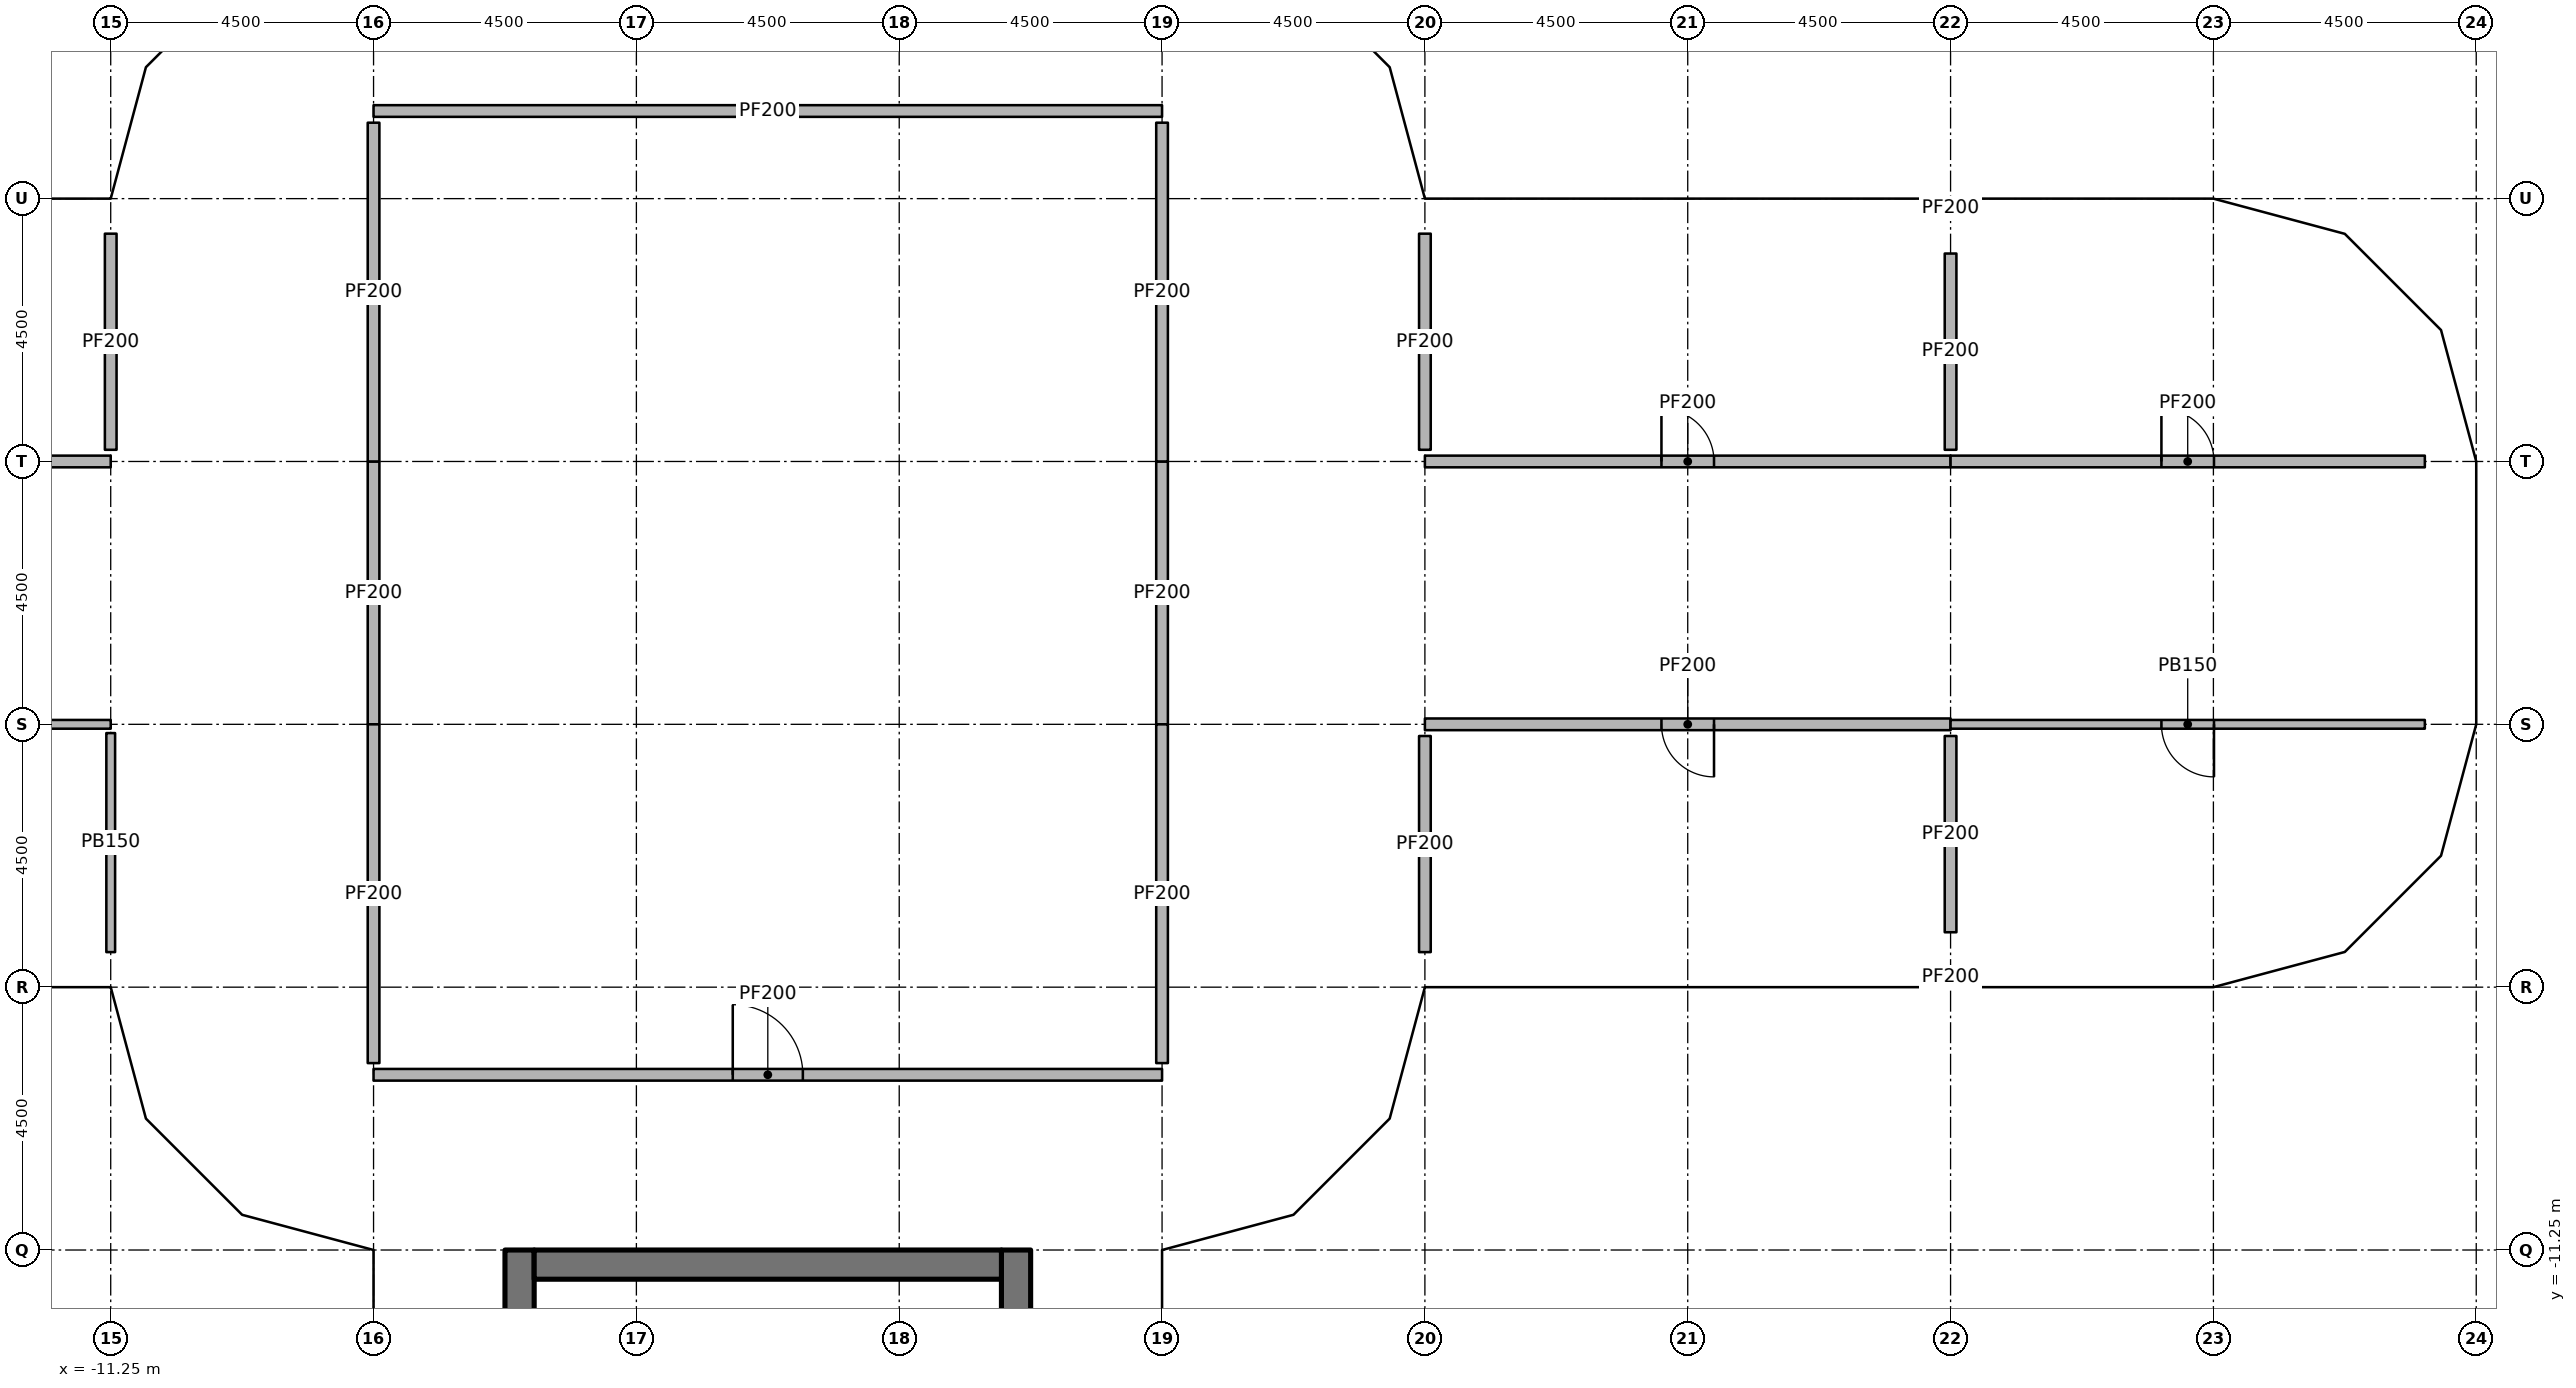
"""IFC4 building model, lengths in metres.
Left out: names, types, materials, properties, quantities, classifications, styles, units other than length and angle.
Written with IfcOpenShell. Run it as: python <this file> out.ifc"""

import sys

from ifc_helpers import new_model, si_unit, direction, frame, frame_2d, origin, origin_2d, place, context, subcontext, project, spatial, rectangle, extrude, element, fill, save


model = new_model("IFC4")
c1 = context("Model", 3, precision=1e-05, world=origin(), true_north=direction((0.0, 1.0)))
c2 = subcontext(c1, "Body", "Model", "MODEL_VIEW")
j1 = project(units=[si_unit("LENGTHUNIT", "METRE"), si_unit("PLANEANGLEUNIT", "RADIAN")], contexts=[c1])
p1 = place(None, origin())
s1 = spatial("IfcSite", under=j1, at=p1, CompositionType="ELEMENT")
p2 = place(p1, origin())
s2 = spatial("IfcBuilding", under=s1, at=p2, CompositionType="ELEMENT")
p3 = place(p2, frame((0.0, 0.0, 284.0)))
s3 = spatial("IfcBuildingStorey", under=s2, at=p3, CompositionType="ELEMENT", Elevation=284.0)
for number, where, z_axis, x_axis in (
    (1, (-10.75, -6.25, 0.0), (0.0, 0.0, 1.0), (1.0, 0.0, 0.0)),
    (2, (-10.75, 6.25, 0.0), (0.0, 0.0, 1.0), (1.0, 0.0, 0.0)),
    (3, (-6.25, -10.75, 0.0), (0.0, 0.0, 1.0), (1.0, 0.0, 0.0)),
    (4, (-6.25, -6.25, 0.0), (0.0, 0.0, 1.0), (1.0, 0.0, 0.0)),
    (5, (-6.25, 6.25, 0.0), (0.0, 0.0, 1.0), (1.0, 0.0, 0.0)),
    (6, (6.25, -10.75, 0.0), (0.0, 0.0, 1.0), (1.0, 0.0, 0.0)),
    (7, (6.25, -6.25, 0.0), (0.0, 0.0, 1.0), (1.0, 0.0, 0.0)),
    (8, (6.25, 6.25, 0.0), (0.0, 0.0, 1.0), (1.0, 0.0, 0.0)),
    (9, (10.75, -6.25, 0.0), (0.0, 0.0, 1.0), (1.0, 0.0, 0.0)),
    (10, (10.75, 6.25, 0.0), (0.0, 0.0, 1.0), (1.0, 0.0, 0.0)),
    (11, (15.75, -6.25, 0.0), (0.0, 0.0, 1.0), (1.0, 0.0, 0.0)),
    (12, (15.75, 6.25, 0.0), (0.0, 0.0, 1.0), (1.0, 0.0, 0.0)),
    (13, (20.25, -6.11, 0.0), (0.0, 0.0, 1.0), (1.0, 0.0, 0.0)),
    (14, (20.25, 6.11, 0.0), (0.0, 0.0, 1.0), (1.0, 0.0, 0.0)),
    (15, (24.75, -6.11, 0.0), (0.0, 0.0, 1.0), (1.0, 0.0, 0.0)),
    (16, (24.75, 6.11, 0.0), (0.0, 0.0, 1.0), (1.0, 0.0, 0.0)),
    (17, (28.67, -2.25, 0.0), (0.0, 0.0, 1.0), (1.0, 0.0, 0.0)),
    (18, (28.67, 2.25, 0.0), (0.0, 0.0, 1.0), (1.0, 0.0, 0.0)),
):
    element("IfcColumn", number, at=place(p3, frame(where, z_axis=z_axis, x_axis=x_axis)), inside=s3, PredefinedType="COLUMN", context=c2, shape_type="SweptSolid", body=[
        extrude(rectangle(XDim=0.6, YDim=0.6, at=origin_2d()), origin(), (0.0, 0.0, 1.0), 7.45),
    ])
p4 = place(p3, frame((-4.25, -11.25, 0.0), z_axis=(0.0, 0.0, 1.0), x_axis=(0.0, -1.0, 0.0)))
e19 = element("IfcWall", 19, at=p4, inside=s3, PredefinedType="SHEAR", context=c2, shape_type="SweptSolid", body=[
    extrude(rectangle(XDim=15.0, YDim=0.5, at=frame_2d((7.5, 0.0))), origin(), (0.0, 0.0, 1.0), 7.6),
])
p5 = place(p4, frame((7.15, 0.0, 0.0)))
e20 = element("IfcOpeningElement", 20, at=p5, cuts=e19, PredefinedType="OPENING", context=c2, shape_type="SweptSolid", body=[
    extrude(rectangle(XDim=1.5, YDim=2.3, at=frame_2d((0.75, 1.15))), frame((0.0, 0.26, 0.0), z_axis=(0.0, -1.0, 0.0), x_axis=(1.0, 0.0, 0.0)), (0.0, 0.0, 1.0), 0.52),
])
p6 = place(p4, frame((5.55, 0.0, 0.0)))
e21 = element("IfcOpeningElement", 21, at=p6, cuts=e19, PredefinedType="OPENING", context=c2, shape_type="SweptSolid", body=[
    extrude(rectangle(XDim=1.2, YDim=2.1, at=frame_2d((0.6, 1.05))), frame((0.0, 0.26, 0.0), z_axis=(0.0, -1.0, 0.0), x_axis=(1.0, 0.0, 0.0)), (0.0, 0.0, 1.0), 0.52),
])
p7 = place(p3, frame((4.25, -11.25, 0.0), z_axis=(0.0, 0.0, 1.0), x_axis=(0.0, -1.0, 0.0)))
e22 = element("IfcWall", 22, at=p7, inside=s3, PredefinedType="SHEAR", context=c2, shape_type="SweptSolid", body=[
    extrude(rectangle(XDim=15.0, YDim=0.5, at=frame_2d((7.5, 0.0))), origin(), (0.0, 0.0, 1.0), 7.6),
])
p8 = place(p7, frame((7.15, 0.0, 0.0)))
e23 = element("IfcOpeningElement", 23, at=p8, cuts=e22, PredefinedType="OPENING", context=c2, shape_type="SweptSolid", body=[
    extrude(rectangle(XDim=1.5, YDim=2.3, at=frame_2d((0.75, 1.15))), frame((0.0, 0.26, 0.0), z_axis=(0.0, -1.0, 0.0), x_axis=(1.0, 0.0, 0.0)), (0.0, 0.0, 1.0), 0.52),
])
p9 = place(p7, frame((13.9, 0.0, 0.0)))
e24 = element("IfcOpeningElement", 24, at=p9, cuts=e22, PredefinedType="OPENING", context=c2, shape_type="SweptSolid", body=[
    extrude(rectangle(XDim=0.9, YDim=2.1, at=frame_2d((0.45, 1.05))), frame((0.0, 0.26, 0.0), z_axis=(0.0, -1.0, 0.0), x_axis=(1.0, 0.0, 0.0)), (0.0, 0.0, 1.0), 0.52),
])
p10 = place(p7, frame((1.15, 0.0, 0.0)))
e25 = element("IfcOpeningElement", 25, at=p10, cuts=e22, PredefinedType="OPENING", context=c2, shape_type="SweptSolid", body=[
    extrude(rectangle(XDim=1.2, YDim=2.1, at=frame_2d((0.6, 1.05))), frame((0.0, 0.26, 0.0), z_axis=(0.0, -1.0, 0.0), x_axis=(1.0, 0.0, 0.0)), (0.0, 0.0, 1.0), 0.52),
])
p11 = place(p3, frame((-4.0, -11.5, 0.0), z_axis=(0.0, 0.0, 1.0), x_axis=(1.0, 0.0, 0.0)))
e26 = element("IfcWall", 26, at=p11, inside=s3, PredefinedType="SHEAR", context=c2, shape_type="SweptSolid", body=[
    extrude(rectangle(XDim=8.0, YDim=0.5, at=frame_2d((4.0, 0.0))), origin(), (0.0, 0.0, 1.0), 7.6),
])
p12 = place(p3, frame((-6.75, -8.25, 0.0), z_axis=(0.0, 0.0, 1.0), x_axis=(1.0, 0.0, 0.0)))
e27 = element("IfcWall", 27, at=p12, inside=s3, PredefinedType="PARTITIONING", context=c2, shape_type="SweptSolid", body=[
    extrude(rectangle(XDim=13.5, YDim=0.2, at=frame_2d((6.75, 0.0))), origin(), (0.0, 0.0, 1.0), 7.45),
])
p13 = place(p12, frame((6.15, 0.0, 0.0)))
e28 = element("IfcOpeningElement", 28, at=p13, cuts=e27, PredefinedType="OPENING", context=c2, shape_type="SweptSolid", body=[
    extrude(rectangle(XDim=1.2, YDim=2.1, at=frame_2d((0.6, 1.05))), frame((0.0, 0.11, 0.0), z_axis=(0.0, -1.0, 0.0), x_axis=(1.0, 0.0, 0.0)), (0.0, 0.0, 1.0), 0.22),
])
p14 = place(p3, frame((-6.75, 8.25, 0.0), z_axis=(0.0, 0.0, 1.0), x_axis=(1.0, 0.0, 0.0)))
e29 = element("IfcWall", 29, at=p14, inside=s3, PredefinedType="PARTITIONING", context=c2, shape_type="SweptSolid", body=[
    extrude(rectangle(XDim=13.5, YDim=0.2, at=frame_2d((6.75, 0.0))), origin(), (0.0, 0.0, 1.0), 7.45),
])
for number, where, z_axis, x_axis in (
    (30, (6.75, 2.25, 0.0), (0.0, 0.0, 1.0), (0.0, -1.0, 0.0)),
    (31, (-6.75, -2.25, 0.0), (0.0, 0.0, 1.0), (0.0, 1.0, 0.0)),
):
    element("IfcWall", number, at=place(p3, frame(where, z_axis=z_axis, x_axis=x_axis)), inside=s3, PredefinedType="PARTITIONING", context=c2, shape_type="SweptSolid", body=[
        extrude(rectangle(XDim=4.5, YDim=0.2, at=frame_2d((2.25, 0.0))), origin(), (0.0, 0.0, 1.0), 7.45),
    ])
for number, where, z_axis, x_axis in (
    (32, (-6.75, -8.05, 0.0), (0.0, 0.0, 1.0), (0.0, 1.0, 0.0)),
    (33, (6.75, -2.25, 0.0), (0.0, 0.0, 1.0), (0.0, -1.0, 0.0)),
    (34, (-6.75, 2.25, 0.0), (0.0, 0.0, 1.0), (0.0, 1.0, 0.0)),
    (35, (6.75, 8.05, 0.0), (0.0, 0.0, 1.0), (0.0, -1.0, 0.0)),
):
    element("IfcWall", number, at=place(p3, frame(where, z_axis=z_axis, x_axis=x_axis)), inside=s3, PredefinedType="PARTITIONING", context=c2, shape_type="SweptSolid", body=[
        extrude(rectangle(XDim=5.8, YDim=0.2, at=frame_2d((2.9, 0.0))), origin(), (0.0, 0.0, 1.0), 6.681),
    ])
p15 = place(p3, frame((11.25, 2.25, 0.0), z_axis=(0.0, 0.0, 1.0), x_axis=(1.0, 0.0, 0.0)))
e36 = element("IfcWall", 36, at=p15, inside=s3, PredefinedType="PARTITIONING", context=c2, shape_type="SweptSolid", body=[
    extrude(rectangle(XDim=9.0, YDim=0.2, at=frame_2d((4.5, 0.0))), origin(), (0.0, 0.0, 1.0), 6.828),
])
p16 = place(p15, frame((4.05, 0.0, 0.0)))
e37 = element("IfcOpeningElement", 37, at=p16, cuts=e36, PredefinedType="OPENING", context=c2, shape_type="SweptSolid", body=[
    extrude(rectangle(XDim=0.9, YDim=2.1, at=frame_2d((0.45, 1.05))), frame((0.0, 0.11, 0.0), z_axis=(0.0, -1.0, 0.0), x_axis=(1.0, 0.0, 0.0)), (0.0, 0.0, 1.0), 0.22),
])
p17 = place(p3, frame((20.25, -2.25, 0.0), z_axis=(0.0, 0.0, 1.0), x_axis=(-1.0, 0.0, 0.0)))
e38 = element("IfcWall", 38, at=p17, inside=s3, PredefinedType="PARTITIONING", context=c2, shape_type="SweptSolid", body=[
    extrude(rectangle(XDim=9.0, YDim=0.2, at=frame_2d((4.5, 0.0))), origin(), (0.0, 0.0, 1.0), 6.828),
])
p18 = place(p17, frame((4.05, 0.0, 0.0)))
e39 = element("IfcOpeningElement", 39, at=p18, cuts=e38, PredefinedType="OPENING", context=c2, shape_type="SweptSolid", body=[
    extrude(rectangle(XDim=0.9, YDim=2.1, at=frame_2d((0.45, 1.05))), frame((0.0, 0.11, 0.0), z_axis=(0.0, -1.0, 0.0), x_axis=(1.0, 0.0, 0.0)), (0.0, 0.0, 1.0), 0.22),
])
p19 = place(p3, frame((20.25, 2.25, 0.0), z_axis=(0.0, 0.0, 1.0), x_axis=(1.0, 0.0, 0.0)))
e40 = element("IfcWall", 40, at=p19, inside=s3, PredefinedType="PARTITIONING", context=c2, shape_type="SweptSolid", body=[
    extrude(rectangle(XDim=8.12, YDim=0.2, at=frame_2d((4.06, 0.0))), origin(), (0.0, 0.0, 1.0), 6.53),
])
p20 = place(p19, frame((3.61, 0.0, 0.0)))
e41 = element("IfcOpeningElement", 41, at=p20, cuts=e40, PredefinedType="OPENING", context=c2, shape_type="SweptSolid", body=[
    extrude(rectangle(XDim=0.9, YDim=2.1, at=frame_2d((0.45, 1.05))), frame((0.0, 0.11, 0.0), z_axis=(0.0, -1.0, 0.0), x_axis=(1.0, 0.0, 0.0)), (0.0, 0.0, 1.0), 0.22),
])
p21 = place(p3, frame((28.37, -2.25, 0.0), z_axis=(0.0, 0.0, 1.0), x_axis=(-1.0, 0.0, 0.0)))
e42 = element("IfcWall", 42, at=p21, inside=s3, PredefinedType="PARTITIONING", context=c2, shape_type="SweptSolid", body=[
    extrude(rectangle(XDim=8.12, YDim=0.15, at=frame_2d((4.06, 0.0))), origin(), (0.0, 0.0, 1.0), 6.53),
])
p22 = place(p21, frame((3.61, 0.0, 0.0)))
e43 = element("IfcOpeningElement", 43, at=p22, cuts=e42, PredefinedType="OPENING", context=c2, shape_type="SweptSolid", body=[
    extrude(rectangle(XDim=0.9, YDim=2.1, at=frame_2d((0.45, 1.05))), frame((0.0, 0.085, 0.0), z_axis=(0.0, -1.0, 0.0), x_axis=(1.0, 0.0, 0.0)), (0.0, 0.0, 1.0), 0.17),
])
p23 = place(p3, frame((-20.25, 2.25, 0.0), z_axis=(0.0, 0.0, 1.0), x_axis=(1.0, 0.0, 0.0)))
e44 = element("IfcWall", 44, at=p23, inside=s3, PredefinedType="PARTITIONING", context=c2, shape_type="SweptSolid", body=[
    extrude(rectangle(XDim=9.0, YDim=0.2, at=frame_2d((4.5, 0.0))), origin(), (0.0, 0.0, 1.0), 6.828),
])
p24 = place(p23, frame((4.05, 0.0, 0.0)))
e45 = element("IfcOpeningElement", 45, at=p24, cuts=e44, PredefinedType="OPENING", context=c2, shape_type="SweptSolid", body=[
    extrude(rectangle(XDim=0.9, YDim=2.1, at=frame_2d((0.45, 1.05))), frame((0.0, 0.11, 0.0), z_axis=(0.0, -1.0, 0.0), x_axis=(1.0, 0.0, 0.0)), (0.0, 0.0, 1.0), 0.22),
])
p25 = place(p3, frame((-11.25, -2.25, 0.0), z_axis=(0.0, 0.0, 1.0), x_axis=(-1.0, 0.0, 0.0)))
e46 = element("IfcWall", 46, at=p25, inside=s3, PredefinedType="PARTITIONING", context=c2, shape_type="SweptSolid", body=[
    extrude(rectangle(XDim=9.0, YDim=0.15, at=frame_2d((4.5, 0.0))), origin(), (0.0, 0.0, 1.0), 6.828),
])
p26 = place(p25, frame((4.05, 0.0, 0.0)))
e47 = element("IfcOpeningElement", 47, at=p26, cuts=e46, PredefinedType="OPENING", context=c2, shape_type="SweptSolid", body=[
    extrude(rectangle(XDim=0.9, YDim=2.1, at=frame_2d((0.45, 1.05))), frame((0.0, 0.085, 0.0), z_axis=(0.0, -1.0, 0.0), x_axis=(1.0, 0.0, 0.0)), (0.0, 0.0, 1.0), 0.17),
])
p27 = place(p3, frame((20.25, 6.75, 0.0), z_axis=(0.0, 0.0, 1.0), x_axis=(0.0, -1.0, 0.0)))
e48 = element("IfcWall", 48, at=p27, inside=s3, PredefinedType="PARTITIONING", context=c2, shape_type="SweptSolid", body=[
    extrude(rectangle(XDim=0.34, YDim=0.2, at=frame_2d((0.17, 0.0))), origin(), (0.0, 0.0, 1.0), 7.45),
])
p28 = place(p3, frame((20.25, 5.81, 0.0), z_axis=(0.0, 0.0, 1.0), x_axis=(0.0, -1.0, 0.0)))
e49 = element("IfcWall", 49, at=p28, inside=s3, PredefinedType="PARTITIONING", context=c2, shape_type="SweptSolid", body=[
    extrude(rectangle(XDim=3.36, YDim=0.2, at=frame_2d((1.68, 0.0))), origin(), (0.0, 0.0, 1.0), 7.45),
])
p29 = place(p3, frame((11.25, 2.45, 0.0), z_axis=(0.0, 0.0, 1.0), x_axis=(0.0, 1.0, 0.0)))
e50 = element("IfcWall", 50, at=p29, inside=s3, PredefinedType="PARTITIONING", context=c2, shape_type="SweptSolid", body=[
    extrude(rectangle(XDim=3.7, YDim=0.2, at=frame_2d((1.85, 0.0))), origin(), (0.0, 0.0, 1.0), 7.45),
])
p30 = place(p3, frame((20.25, -2.45, 0.0), z_axis=(0.0, 0.0, 1.0), x_axis=(0.0, -1.0, 0.0)))
e51 = element("IfcWall", 51, at=p30, inside=s3, PredefinedType="PARTITIONING", context=c2, shape_type="SweptSolid", body=[
    extrude(rectangle(XDim=3.36, YDim=0.2, at=frame_2d((1.68, 0.0))), origin(), (0.0, 0.0, 1.0), 7.45),
])
p31 = place(p3, frame((20.25, -6.41, 0.0), z_axis=(0.0, 0.0, 1.0), x_axis=(0.0, -1.0, 0.0)))
e52 = element("IfcWall", 52, at=p31, inside=s3, PredefinedType="PARTITIONING", context=c2, shape_type="SweptSolid", body=[
    extrude(rectangle(XDim=0.34, YDim=0.2, at=frame_2d((0.17, 0.0))), origin(), (0.0, 0.0, 1.0), 7.45),
])
for number, where, z_axis, x_axis in (
    (53, (11.25, -6.15, 0.0), (0.0, 0.0, 1.0), (0.0, 1.0, 0.0)),
    (54, (-11.25, 6.15, 0.0), (0.0, 0.0, 1.0), (0.0, -1.0, 0.0)),
):
    element("IfcWall", number, at=place(p3, frame(where, z_axis=z_axis, x_axis=x_axis)), inside=s3, PredefinedType="PARTITIONING", context=c2, shape_type="SweptSolid", body=[
        extrude(rectangle(XDim=3.7, YDim=0.2, at=frame_2d((1.85, 0.0))), origin(), (0.0, 0.0, 1.0), 7.45),
    ])
p32 = place(p3, frame((-11.25, -2.4, 0.0), z_axis=(0.0, 0.0, 1.0), x_axis=(0.0, -1.0, 0.0)))
e55 = element("IfcWall", 55, at=p32, inside=s3, PredefinedType="PARTITIONING", context=c2, shape_type="SweptSolid", body=[
    extrude(rectangle(XDim=3.75, YDim=0.15, at=frame_2d((1.875, 0.0))), origin(), (0.0, 0.0, 1.0), 7.45),
])
p33 = place(p13, origin())
e56 = element("IfcDoor", 56, at=p33, inside=s3, OperationType="SINGLE_SWING_LEFT", PredefinedType="DOOR", context=c2, shape_type="SweptSolid", body=[
    extrude(rectangle(XDim=1.2, YDim=2.1, at=frame_2d((0.6, 1.05))), frame((0.0, 0.025, 0.0), z_axis=(0.0, -1.0, 0.0), x_axis=(1.0, 0.0, 0.0)), (0.0, 0.0, 1.0), 0.05),
])
fill(e28, e56)
p34 = place(p16, origin())
e57 = element("IfcDoor", 57, at=p34, inside=s3, OperationType="SINGLE_SWING_LEFT", PredefinedType="DOOR", context=c2, shape_type="SweptSolid", body=[
    extrude(rectangle(XDim=0.9, YDim=2.1, at=frame_2d((0.45, 1.05))), frame((0.0, 0.025, 0.0), z_axis=(0.0, -1.0, 0.0), x_axis=(1.0, 0.0, 0.0)), (0.0, 0.0, 1.0), 0.05),
])
fill(e37, e57)
p35 = place(p18, origin())
e58 = element("IfcDoor", 58, at=p35, inside=s3, OperationType="SINGLE_SWING_LEFT", PredefinedType="DOOR", context=c2, shape_type="SweptSolid", body=[
    extrude(rectangle(XDim=0.9, YDim=2.1, at=frame_2d((0.45, 1.05))), frame((0.0, 0.025, 0.0), z_axis=(0.0, -1.0, 0.0), x_axis=(1.0, 0.0, 0.0)), (0.0, 0.0, 1.0), 0.05),
])
fill(e39, e58)
p36 = place(p20, origin())
e59 = element("IfcDoor", 59, at=p36, inside=s3, OperationType="SINGLE_SWING_LEFT", PredefinedType="DOOR", context=c2, shape_type="SweptSolid", body=[
    extrude(rectangle(XDim=0.9, YDim=2.1, at=frame_2d((0.45, 1.05))), frame((0.0, 0.025, 0.0), z_axis=(0.0, -1.0, 0.0), x_axis=(1.0, 0.0, 0.0)), (0.0, 0.0, 1.0), 0.05),
])
fill(e41, e59)
p37 = place(p22, origin())
e60 = element("IfcDoor", 60, at=p37, inside=s3, OperationType="SINGLE_SWING_LEFT", PredefinedType="DOOR", context=c2, shape_type="SweptSolid", body=[
    extrude(rectangle(XDim=0.9, YDim=2.1, at=frame_2d((0.45, 1.05))), frame((0.0, 0.025, 0.0), z_axis=(0.0, -1.0, 0.0), x_axis=(1.0, 0.0, 0.0)), (0.0, 0.0, 1.0), 0.05),
])
fill(e43, e60)
save(model, sys.argv[1])
